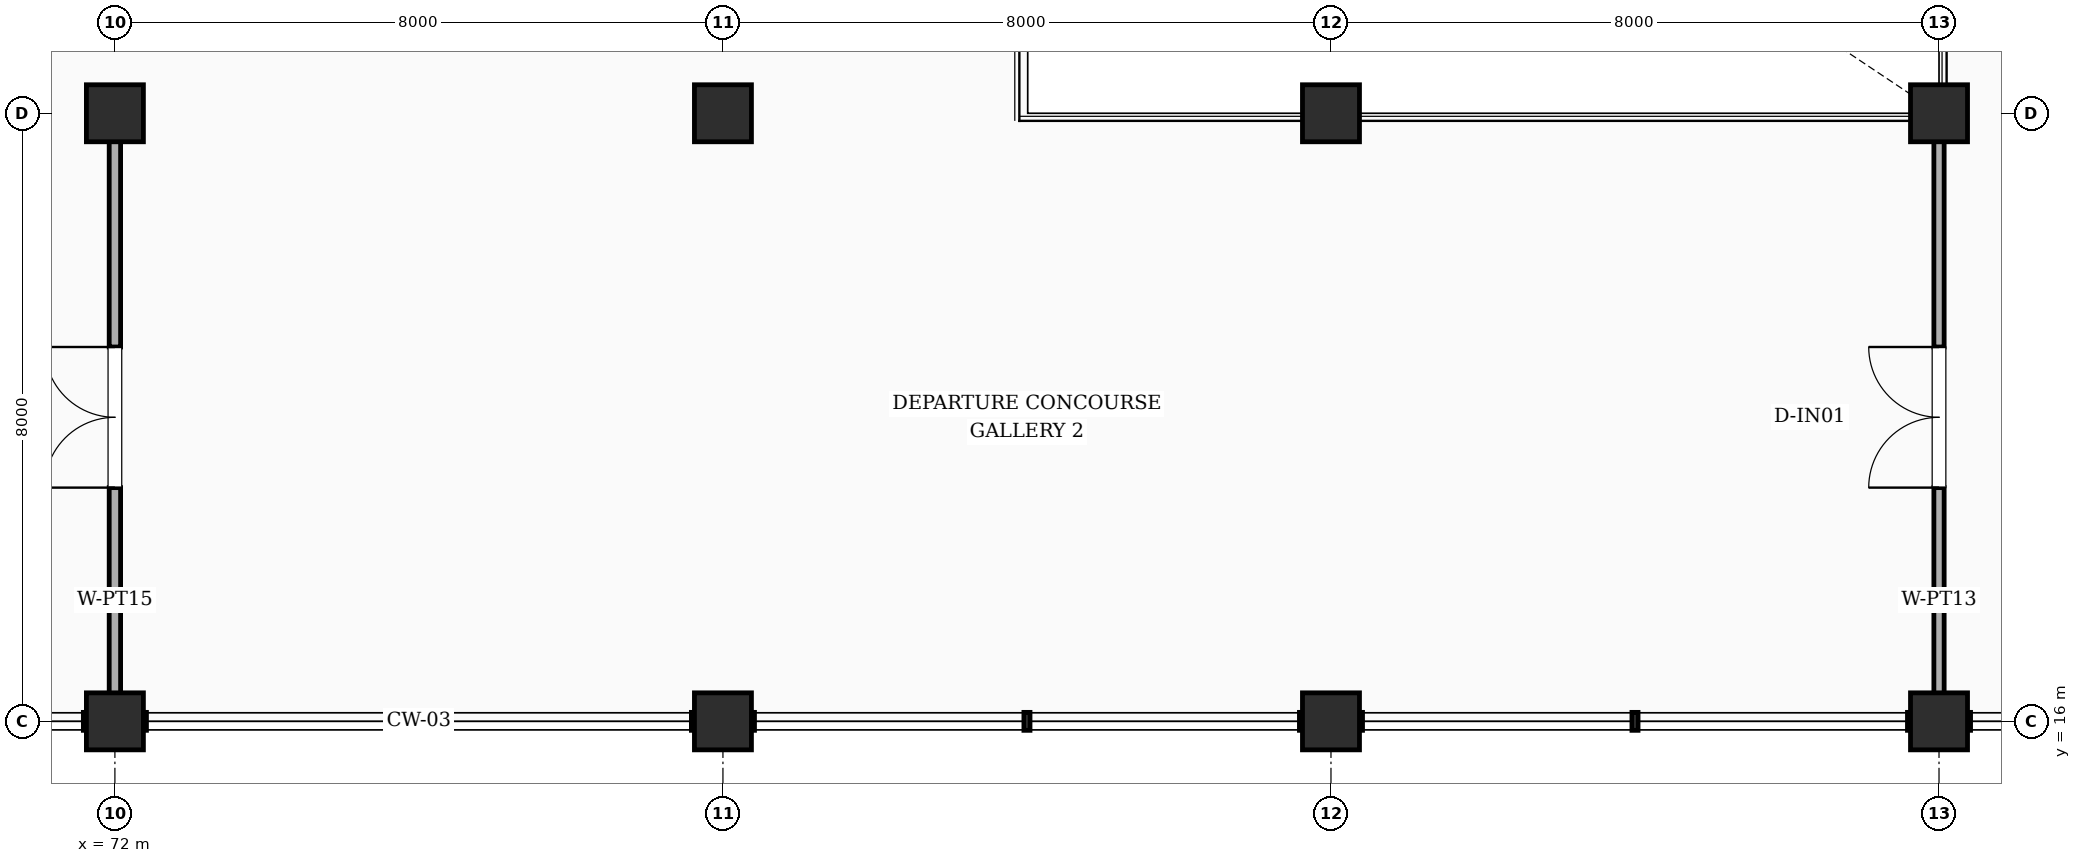
"""IFC4 building model, lengths in metres.
Left out: names, types, materials, properties, quantities, classifications, styles, units other than length and angle.
Written with IfcOpenShell. Run it as: python <this file> out.ifc"""

import sys

from ifc_helpers import new_model, si_unit, direction, frame, frame_2d, origin, origin_2d, place, context, subcontext, project, spatial, rectangle, extrude, element, fill, save


model = new_model("IFC4")
c1 = context("Model", 3, precision=1e-05, world=origin(), true_north=direction((0.0, 1.0)))
c2 = subcontext(c1, "Body", "Model", "MODEL_VIEW")
j1 = project(units=[si_unit("LENGTHUNIT", "METRE"), si_unit("PLANEANGLEUNIT", "RADIAN")], contexts=[c1])
p1 = place(None, origin())
s1 = spatial("IfcSite", under=j1, at=p1, CompositionType="ELEMENT")
p2 = place(p1, origin())
s2 = spatial("IfcBuilding", under=s1, at=p2, CompositionType="ELEMENT")
p3 = place(p2, frame((0.0, 0.0, 5.4)))
s3 = spatial("IfcBuildingStorey", under=s2, at=p3, CompositionType="ELEMENT", Elevation=5.4)
for number, where, z_axis, x_axis in (
    (1, (72.0, 16.0, 0.0), (0.0, 0.0, 1.0), (1.0, 0.0, 0.0)),
    (2, (72.0, 24.0, 0.0), (0.0, 0.0, 1.0), (1.0, 0.0, 0.0)),
    (3, (80.0, 16.0, 0.0), (0.0, 0.0, 1.0), (1.0, 0.0, 0.0)),
    (4, (80.0, 24.0, 0.0), (0.0, 0.0, 1.0), (1.0, 0.0, 0.0)),
    (5, (88.0, 16.0, 0.0), (0.0, 0.0, 1.0), (1.0, 0.0, 0.0)),
    (6, (88.0, 24.0, 0.0), (0.0, 0.0, 1.0), (1.0, 0.0, 0.0)),
    (7, (96.0, 16.0, 0.0), (0.0, 0.0, 1.0), (1.0, 0.0, 0.0)),
    (8, (96.0, 24.0, 0.0), (0.0, 0.0, 1.0), (1.0, 0.0, 0.0)),
):
    element("IfcColumn", number, at=place(p3, frame(where, z_axis=z_axis, x_axis=x_axis)), inside=s3, PredefinedType="COLUMN", context=c2, shape_type="SweptSolid", body=[
        extrude(rectangle(XDim=0.75, YDim=0.75, at=origin_2d()), origin(), (0.0, 0.0, 1.0), 5.4),
    ])
p4 = place(p3, frame((72.0, 16.12, 0.0), z_axis=(0.0, 0.0, 1.0), x_axis=(0.0, 1.0, 0.0)))
e9 = element("IfcWall", 9, at=p4, inside=s3, PredefinedType="PARTITIONING", context=c2, shape_type="SweptSolid", body=[
    extrude(rectangle(XDim=7.76, YDim=0.15, at=frame_2d((3.88, 0.0))), origin(), (0.0, 0.0, 1.0), 4.38),
])
p5 = place(p4, frame((2.955, 0.0, 0.0)))
e10 = element("IfcOpeningElement", 10, at=p5, cuts=e9, PredefinedType="OPENING", context=c2, shape_type="SweptSolid", body=[
    extrude(rectangle(XDim=1.85, YDim=2.3, at=frame_2d((0.925, 1.15))), frame((0.0, 0.085, 0.0), z_axis=(0.0, -1.0, 0.0), x_axis=(1.0, 0.0, 0.0)), (0.0, 0.0, 1.0), 0.17),
])
p6 = place(p3, frame((96.0, 16.12, 0.0), z_axis=(0.0, 0.0, 1.0), x_axis=(0.0, 1.0, 0.0)))
e11 = element("IfcWall", 11, at=p6, inside=s3, PredefinedType="PARTITIONING", context=c2, shape_type="SweptSolid", body=[
    extrude(rectangle(XDim=7.76, YDim=0.135, at=frame_2d((3.88, 0.0))), origin(), (0.0, 0.0, 1.0), 4.38),
])
p7 = place(p6, frame((2.955, 0.0, 0.0)))
e12 = element("IfcOpeningElement", 12, at=p7, cuts=e11, PredefinedType="OPENING", context=c2, shape_type="SweptSolid", body=[
    extrude(rectangle(XDim=1.85, YDim=2.3, at=frame_2d((0.925, 1.15))), frame((0.0, 0.077, 0.0), z_axis=(0.0, -1.0, 0.0), x_axis=(1.0, 0.0, 0.0)), (0.0, 0.0, 1.0), 0.155),
])
p8 = place(p5, origin())
e13 = element("IfcDoor", 13, at=p8, inside=s3, OperationType="DOUBLE_DOOR_SINGLE_SWING", PredefinedType="DOOR", context=c2, shape_type="SweptSolid", body=[
    extrude(rectangle(XDim=1.85, YDim=2.3, at=frame_2d((0.925, 1.15))), frame((0.0, 0.025, 0.0), z_axis=(0.0, -1.0, 0.0), x_axis=(1.0, 0.0, 0.0)), (0.0, 0.0, 1.0), 0.05),
])
fill(e10, e13)
p9 = place(p7, origin())
e14 = element("IfcDoor", 14, at=p9, inside=s3, OperationType="DOUBLE_DOOR_SINGLE_SWING", PredefinedType="DOOR", context=c2, shape_type="SweptSolid", body=[
    extrude(rectangle(XDim=1.85, YDim=2.3, at=frame_2d((0.925, 1.15))), frame((0.0, 0.025, 0.0), z_axis=(0.0, -1.0, 0.0), x_axis=(1.0, 0.0, 0.0)), (0.0, 0.0, 1.0), 0.05),
])
fill(e12, e14)
save(model, sys.argv[1])
